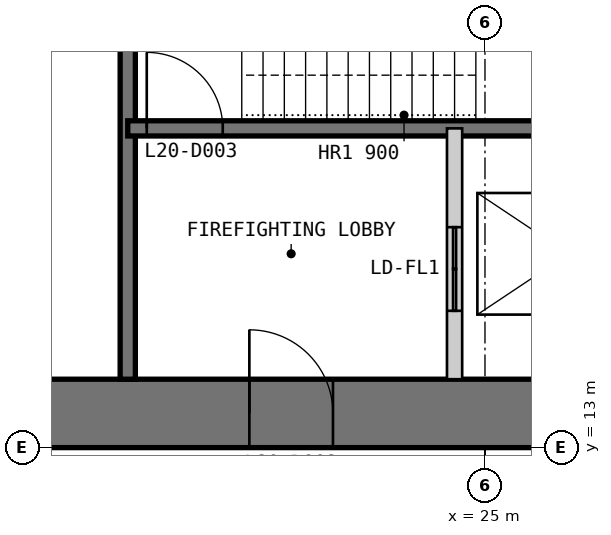
"""IFC4 building model, lengths in metres.
Left out: names, types, materials, properties, quantities, classifications, styles, units other than length and angle.
Written with IfcOpenShell. Run it as: python <this file> out.ifc"""

import sys

from ifc_helpers import new_model, si_unit, direction, frame, frame_2d, origin, place, context, subcontext, project, spatial, polyline, rectangle, outline, extrude, element, fill, save


model = new_model("IFC4")
c1 = context("Model", 3, precision=1e-05, world=origin(), true_north=direction((0.0, 1.0)))
c2 = subcontext(c1, "Body", "Model", "MODEL_VIEW")
j1 = project(units=[si_unit("LENGTHUNIT", "METRE"), si_unit("PLANEANGLEUNIT", "RADIAN")], contexts=[c1])
p1 = place(None, origin())
s1 = spatial("IfcSite", under=j1, at=p1, CompositionType="ELEMENT")
p2 = place(p1, origin())
s2 = spatial("IfcBuilding", under=s1, at=p2, CompositionType="ELEMENT")
p3 = place(p2, frame((0.0, 0.0, 87.0)))
s3 = spatial("IfcBuildingStorey", under=s2, at=p3, CompositionType="ELEMENT", Elevation=87.0)
p4 = place(p3, frame((13.0, 13.45, 0.0), z_axis=(0.0, 0.0, 1.0), x_axis=(1.0, 0.0, 0.0)))
e1 = element("IfcWall", 1, at=p4, inside=s3, PredefinedType="SHEAR", context=c2, shape_type="SweptSolid", body=[
    extrude(outline(polyline([(0.0, -0.45), (24.0, -0.45), (23.1, 0.45), (0.9, 0.45), (0.0, -0.45)])), origin(), (0.0, 0.0, 1.0), 4.0),
])
p5 = place(p4, frame((4.9, 0.0, 0.0)))
e2 = element("IfcOpeningElement", 2, at=p5, cuts=e1, PredefinedType="OPENING", context=c2, shape_type="SweptSolid", body=[
    extrude(rectangle(XDim=1.0, YDim=2.2, at=frame_2d((0.5, 1.1))), frame((0.0, 0.46, 0.0), z_axis=(0.0, -1.0, 0.0), x_axis=(1.0, 0.0, 0.0)), (0.0, 0.0, 1.0), 0.92),
])
p6 = place(p4, frame((8.9, 0.0, 0.0)))
e3 = element("IfcOpeningElement", 3, at=p6, cuts=e1, PredefinedType="OPENING", context=c2, shape_type="SweptSolid", body=[
    extrude(rectangle(XDim=1.1, YDim=2.2, at=frame_2d((0.55, 1.1))), frame((0.0, 0.46, 0.0), z_axis=(0.0, -1.0, 0.0), x_axis=(1.0, 0.0, 0.0)), (0.0, 0.0, 1.0), 0.92),
])
p7 = place(p4, frame((15.05, 0.0, 0.0)))
e4 = element("IfcOpeningElement", 4, at=p7, cuts=e1, PredefinedType="OPENING", context=c2, shape_type="SweptSolid", body=[
    extrude(rectangle(XDim=0.9, YDim=2.2, at=frame_2d((0.45, 1.1))), frame((0.0, 0.46, 0.0), z_axis=(0.0, -1.0, 0.0), x_axis=(1.0, 0.0, 0.0)), (0.0, 0.0, 1.0), 0.92),
])
p8 = place(p4, frame((17.9, 0.0, 0.0)))
e5 = element("IfcOpeningElement", 5, at=p8, cuts=e1, PredefinedType="OPENING", context=c2, shape_type="SweptSolid", body=[
    extrude(rectangle(XDim=1.0, YDim=2.2, at=frame_2d((0.5, 1.1))), frame((0.0, 0.46, 0.0), z_axis=(0.0, -1.0, 0.0), x_axis=(1.0, 0.0, 0.0)), (0.0, 0.0, 1.0), 0.92),
])
p9 = place(p4, frame((21.4, 0.0, 0.0)))
e6 = element("IfcOpeningElement", 6, at=p9, cuts=e1, PredefinedType="OPENING", context=c2, shape_type="SweptSolid", body=[
    extrude(rectangle(XDim=1.0, YDim=2.2, at=frame_2d((0.5, 1.1))), frame((0.0, 0.46, 0.0), z_axis=(0.0, -1.0, 0.0), x_axis=(1.0, 0.0, 0.0)), (0.0, 0.0, 1.0), 0.92),
])
p10 = place(p3, frame((20.3, 13.9, 0.0), z_axis=(0.0, 0.0, 1.0), x_axis=(0.0, 1.0, 0.0)))
e7 = element("IfcWall", 7, at=p10, inside=s3, PredefinedType="SOLIDWALL", context=c2, shape_type="SweptSolid", body=[
    extrude(rectangle(XDim=16.1, YDim=0.2, at=frame_2d((8.05, 0.0))), origin(), (0.0, 0.0, 1.0), 3.8),
])
p11 = place(p3, frame((20.3, 17.2, 0.0), z_axis=(0.0, 0.0, 1.0), x_axis=(1.0, 0.0, 0.0)))
e8 = element("IfcWall", 8, at=p11, inside=s3, PredefinedType="SOLIDWALL", context=c2, shape_type="SweptSolid", body=[
    extrude(rectangle(XDim=9.4, YDim=0.2, at=frame_2d((4.7, 0.0))), origin(), (0.0, 0.0, 1.0), 3.8),
])
p12 = place(p11, frame((0.25, 0.0, 0.0)))
e9 = element("IfcOpeningElement", 9, at=p12, cuts=e8, PredefinedType="OPENING", context=c2, shape_type="SweptSolid", body=[
    extrude(rectangle(XDim=1.0, YDim=2.2, at=frame_2d((0.5, 1.1))), frame((0.0, 0.11, 0.0), z_axis=(0.0, -1.0, 0.0), x_axis=(1.0, 0.0, 0.0)), (0.0, 0.0, 1.0), 0.22),
])
p13 = place(p3, frame((24.6, 13.9, 0.0), z_axis=(0.0, 0.0, 1.0), x_axis=(0.0, 1.0, 0.0)))
e10 = element("IfcWall", 10, at=p13, inside=s3, PredefinedType="PARTITIONING", context=c2, shape_type="SweptSolid", body=[
    extrude(rectangle(XDim=3.3, YDim=0.2, at=frame_2d((1.65, 0.0))), origin(), (0.0, 0.0, 1.0), 3.8),
])
p14 = place(p13, frame((0.9, 0.0, 0.0)))
e11 = element("IfcOpeningElement", 11, at=p14, cuts=e10, PredefinedType="OPENING", context=c2, shape_type="SweptSolid", body=[
    extrude(rectangle(XDim=1.1, YDim=2.2, at=frame_2d((0.55, 1.1))), frame((0.0, 0.11, 0.0), z_axis=(0.0, -1.0, 0.0), x_axis=(1.0, 0.0, 0.0)), (0.0, 0.0, 1.0), 0.22),
])
p15 = place(p6, origin())
e12 = element("IfcDoor", 12, at=p15, inside=s3, OperationType="SINGLE_SWING_LEFT", PredefinedType="DOOR", context=c2, shape_type="SweptSolid", body=[
    extrude(rectangle(XDim=1.1, YDim=2.2, at=frame_2d((0.55, 1.1))), frame((0.0, 0.025, 0.0), z_axis=(0.0, -1.0, 0.0), x_axis=(1.0, 0.0, 0.0)), (0.0, 0.0, 1.0), 0.05),
    extrude(outline(polyline([(0.0, 0.0), (0.04, 0.0), (0.04, 2.16), (1.06, 2.16), (1.06, 0.0), (1.1, 0.0), (1.1, 2.2), (0.0, 2.2), (0.0, 0.0)])), frame((0.0, 0.3, 0.0), z_axis=(0.0, -1.0, 0.0), x_axis=(1.0, 0.0, 0.0)), (0.0, 0.0, 1.0), 0.6),
])
fill(e3, e12)
p16 = place(p12, origin())
e13 = element("IfcDoor", 13, at=p16, inside=s3, OperationType="SINGLE_SWING_LEFT", PredefinedType="DOOR", context=c2, shape_type="SweptSolid", body=[
    extrude(rectangle(XDim=1.0, YDim=2.2, at=frame_2d((0.5, 1.1))), frame((0.0, 0.025, 0.0), z_axis=(0.0, -1.0, 0.0), x_axis=(1.0, 0.0, 0.0)), (0.0, 0.0, 1.0), 0.05),
])
fill(e9, e13)
p17 = place(p14, origin())
e14 = element("IfcDoor", 14, at=p17, inside=s3, OperationType="DOUBLE_DOOR_SLIDING", PredefinedType="DOOR", context=c2, shape_type="SweptSolid", body=[
    extrude(rectangle(XDim=1.1, YDim=2.2, at=frame_2d((0.55, 1.1))), frame((0.0, 0.025, 0.0), z_axis=(0.0, -1.0, 0.0), x_axis=(1.0, 0.0, 0.0)), (0.0, 0.0, 1.0), 0.05),
])
fill(e11, e14)
save(model, sys.argv[1])
